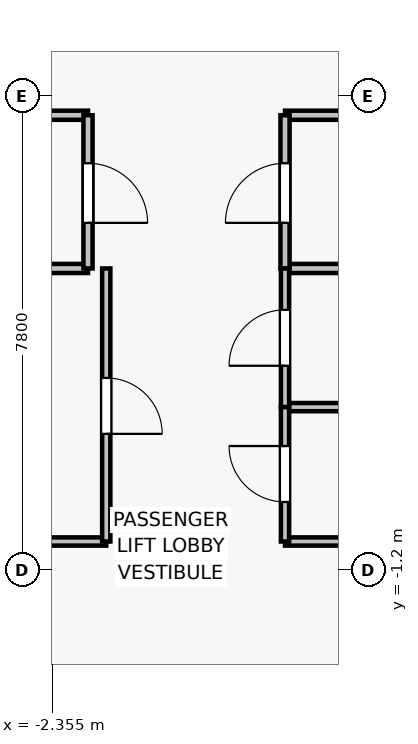
"""IFC4 building model, lengths in metres.
Left out: names, types, materials, properties, quantities, classifications, styles, units other than length and angle.
Written with IfcOpenShell. Run it as: python <this file> out.ifc"""

import sys

from ifc_helpers import new_model, si_unit, direction, frame, frame_2d, origin, place, context, subcontext, project, spatial, rectangle, extrude, source, transform, mapped, element, fill, save


model = new_model("IFC4")
c1 = context("Model", 3, precision=1e-05, world=origin(), true_north=direction((0.0, 1.0)))
c2 = subcontext(c1, "Body", "Model", "MODEL_VIEW")
j1 = project(units=[si_unit("LENGTHUNIT", "METRE"), si_unit("PLANEANGLEUNIT", "RADIAN")], contexts=[c1])
p1 = place(None, origin())
s1 = spatial("IfcSite", under=j1, at=p1, CompositionType="ELEMENT")
p2 = place(p1, origin())
s2 = spatial("IfcBuilding", under=s1, at=p2, CompositionType="ELEMENT")
p3 = place(p2, frame((0.0, 0.0, 238.6)))
s3 = spatial("IfcBuildingStorey", under=s2, at=p3, CompositionType="ELEMENT", Elevation=238.6)
for number, where, z_axis, x_axis in (
    (1, (-1.77, 3.76, 0.0), (0.0, 0.0, 1.0), (-1.0, 0.0, 0.0)),
    (2, (-6.18, 6.28, 0.0), (0.0, 0.0, 1.0), (1.0, 0.0, 0.0)),
):
    element("IfcWall", number, at=place(p3, frame(where, z_axis=z_axis, x_axis=x_axis)), inside=s3, PredefinedType="PARTITIONING", context=c2, shape_type="SweptSolid", body=[
        extrude(rectangle(XDim=4.41, YDim=0.15, at=frame_2d((2.205, 0.0))), origin(), (0.0, 0.0, 1.0), 3.075),
    ])
p4 = place(p3, frame((-1.77, 6.28, 0.0), z_axis=(0.0, 0.0, 1.0), x_axis=(0.0, -1.0, 0.0)))
e3 = element("IfcWall", 3, at=p4, inside=s3, PredefinedType="PARTITIONING", context=c2, shape_type="SweptSolid", body=[
    extrude(rectangle(XDim=2.52, YDim=0.15, at=frame_2d((1.26, 0.0))), origin(), (0.0, 0.0, 1.0), 3.075),
])
p5 = place(p4, frame((0.79, 0.0, 0.0)))
e4 = element("IfcOpeningElement", 4, at=p5, cuts=e3, PredefinedType="OPENING", context=c2, shape_type="SweptSolid", body=[
    extrude(rectangle(XDim=0.98, YDim=2.15, at=frame_2d((0.49, 1.075))), frame((0.0, 0.085, 0.0), z_axis=(0.0, -1.0, 0.0), x_axis=(1.0, 0.0, 0.0)), (0.0, 0.0, 1.0), 0.17),
])
for number, where, z_axis, x_axis in (
    (5, (6.38, 3.76, 0.0), (0.0, 0.0, 1.0), (-1.0, 0.0, 0.0)),
    (6, (1.47, 6.28, 0.0), (0.0, 0.0, 1.0), (1.0, 0.0, 0.0)),
):
    element("IfcWall", number, at=place(p3, frame(where, z_axis=z_axis, x_axis=x_axis)), inside=s3, PredefinedType="PARTITIONING", context=c2, shape_type="SweptSolid", body=[
        extrude(rectangle(XDim=4.91, YDim=0.15, at=frame_2d((2.455, 0.0))), origin(), (0.0, 0.0, 1.0), 3.075),
    ])
p6 = place(p3, frame((1.47, 3.76, 0.0), z_axis=(0.0, 0.0, 1.0), x_axis=(0.0, 1.0, 0.0)))
e7 = element("IfcWall", 7, at=p6, inside=s3, PredefinedType="PARTITIONING", context=c2, shape_type="SweptSolid", body=[
    extrude(rectangle(XDim=2.52, YDim=0.15, at=frame_2d((1.26, 0.0))), origin(), (0.0, 0.0, 1.0), 3.075),
])
p7 = place(p6, frame((0.75, 0.0, 0.0)))
e8 = element("IfcOpeningElement", 8, at=p7, cuts=e7, PredefinedType="OPENING", context=c2, shape_type="SweptSolid", body=[
    extrude(rectangle(XDim=0.98, YDim=2.15, at=frame_2d((0.49, 1.075))), frame((0.0, 0.085, 0.0), z_axis=(0.0, -1.0, 0.0), x_axis=(1.0, 0.0, 0.0)), (0.0, 0.0, 1.0), 0.17),
])
p8 = place(p3, frame((-1.47, -0.73, 0.0), z_axis=(0.0, 0.0, 1.0), x_axis=(-1.0, 0.0, 0.0)))
e9 = element("IfcWall", 9, at=p8, inside=s3, PredefinedType="PARTITIONING", context=c2, shape_type="SweptSolid", body=[
    extrude(rectangle(XDim=5.11, YDim=0.135, at=frame_2d((2.555, 0.0))), origin(), (0.0, 0.0, 1.0), 3.075),
])
p9 = place(p3, frame((-1.47, 3.76, 0.0), z_axis=(0.0, 0.0, 1.0), x_axis=(0.0, -1.0, 0.0)))
e10 = element("IfcWall", 10, at=p9, inside=s3, PredefinedType="PARTITIONING", context=c2, shape_type="SweptSolid", body=[
    extrude(rectangle(XDim=4.49, YDim=0.135, at=frame_2d((2.245, 0.0))), origin(), (0.0, 0.0, 1.0), 3.075),
])
p10 = place(p9, frame((1.8, 0.0, 0.0)))
e11 = element("IfcOpeningElement", 11, at=p10, cuts=e10, PredefinedType="OPENING", context=c2, shape_type="SweptSolid", body=[
    extrude(rectangle(XDim=0.92, YDim=2.1, at=frame_2d((0.46, 1.05))), frame((0.0, 0.077, 0.0), z_axis=(0.0, -1.0, 0.0), x_axis=(1.0, 0.0, 0.0)), (0.0, 0.0, 1.0), 0.155),
])
p11 = place(p3, frame((6.58, 1.48, 0.0), z_axis=(0.0, 0.0, 1.0), x_axis=(-1.0, 0.0, 0.0)))
e12 = element("IfcWall", 12, at=p11, inside=s3, PredefinedType="PARTITIONING", context=c2, shape_type="SweptSolid", body=[
    extrude(rectangle(XDim=5.11, YDim=0.135, at=frame_2d((2.555, 0.0))), origin(), (0.0, 0.0, 1.0), 3.075),
])
p12 = place(p3, frame((1.47, 1.48, 0.0), z_axis=(0.0, 0.0, 1.0), x_axis=(0.0, 1.0, 0.0)))
e13 = element("IfcWall", 13, at=p12, inside=s3, PredefinedType="PARTITIONING", context=c2, shape_type="SweptSolid", body=[
    extrude(rectangle(XDim=2.28, YDim=0.135, at=frame_2d((1.14, 0.0))), origin(), (0.0, 0.0, 1.0), 3.075),
])
p13 = place(p12, frame((0.68, 0.0, 0.0)))
e14 = element("IfcOpeningElement", 14, at=p13, cuts=e13, PredefinedType="OPENING", context=c2, shape_type="SweptSolid", body=[
    extrude(rectangle(XDim=0.92, YDim=2.1, at=frame_2d((0.46, 1.05))), frame((0.0, 0.077, 0.0), z_axis=(0.0, -1.0, 0.0), x_axis=(1.0, 0.0, 0.0)), (0.0, 0.0, 1.0), 0.155),
])
p14 = place(p3, frame((4.18, -0.73, 0.0), z_axis=(0.0, 0.0, 1.0), x_axis=(-1.0, 0.0, 0.0)))
e15 = element("IfcWall", 15, at=p14, inside=s3, PredefinedType="PARTITIONING", context=c2, shape_type="SweptSolid", body=[
    extrude(rectangle(XDim=2.71, YDim=0.135, at=frame_2d((1.355, 0.0))), origin(), (0.0, 0.0, 1.0), 3.075),
])
p15 = place(p3, frame((1.47, -0.73, 0.0), z_axis=(0.0, 0.0, 1.0), x_axis=(0.0, 1.0, 0.0)))
e16 = element("IfcWall", 16, at=p15, inside=s3, PredefinedType="PARTITIONING", context=c2, shape_type="SweptSolid", body=[
    extrude(rectangle(XDim=2.21, YDim=0.135, at=frame_2d((1.105, 0.0))), origin(), (0.0, 0.0, 1.0), 3.075),
])
p16 = place(p15, frame((0.65, 0.0, 0.0)))
e17 = element("IfcOpeningElement", 17, at=p16, cuts=e16, PredefinedType="OPENING", context=c2, shape_type="SweptSolid", body=[
    extrude(rectangle(XDim=0.92, YDim=2.1, at=frame_2d((0.46, 1.05))), frame((0.0, 0.077, 0.0), z_axis=(0.0, -1.0, 0.0), x_axis=(1.0, 0.0, 0.0)), (0.0, 0.0, 1.0), 0.155),
])
m1 = source(origin(), c2, "Body", "SweptSolid", [
    extrude(rectangle(XDim=0.98, YDim=2.15, at=frame_2d((0.49, 1.075))), frame((0.0, 0.025, 0.0), z_axis=(0.0, -1.0, 0.0), x_axis=(1.0, 0.0, 0.0)), (0.0, 0.0, 1.0), 0.05),
])
p17 = place(p5, origin())
e18 = element("IfcDoor", 18, at=p17, inside=s3, OperationType="SINGLE_SWING_RIGHT", PredefinedType="DOOR", context=c2, shape_type="MappedRepresentation", body=[
    mapped(m1, transform((0.0, 0.0, 0.0), x_axis=(1.0, 0.0, 0.0), y_axis=(0.0, 1.0, 0.0), z_axis=(0.0, 0.0, 1.0), scale=1.0)),
])
fill(e4, e18)
p18 = place(p7, origin())
e19 = element("IfcDoor", 19, at=p18, inside=s3, OperationType="SINGLE_SWING_LEFT", PredefinedType="DOOR", context=c2, shape_type="MappedRepresentation", body=[
    mapped(m1, transform((0.0, 0.0, 0.0), x_axis=(1.0, 0.0, 0.0), y_axis=(0.0, 1.0, 0.0), z_axis=(0.0, 0.0, 1.0), scale=1.0)),
])
fill(e8, e19)
m2 = source(origin(), c2, "Body", "SweptSolid", [
    extrude(rectangle(XDim=0.92, YDim=2.1, at=frame_2d((0.46, 1.05))), frame((0.0, 0.025, 0.0), z_axis=(0.0, -1.0, 0.0), x_axis=(1.0, 0.0, 0.0)), (0.0, 0.0, 1.0), 0.05),
])
p19 = place(p10, origin())
e20 = element("IfcDoor", 20, at=p19, inside=s3, OperationType="SINGLE_SWING_RIGHT", PredefinedType="DOOR", context=c2, shape_type="MappedRepresentation", body=[
    mapped(m2, transform((0.0, 0.0, 0.0), x_axis=(1.0, 0.0, 0.0), y_axis=(0.0, 1.0, 0.0), z_axis=(0.0, 0.0, 1.0), scale=1.0)),
])
fill(e11, e20)
p20 = place(p13, origin())
e21 = element("IfcDoor", 21, at=p20, inside=s3, OperationType="SINGLE_SWING_LEFT", PredefinedType="DOOR", context=c2, shape_type="MappedRepresentation", body=[
    mapped(m2, transform((0.0, 0.0, 0.0), x_axis=(1.0, 0.0, 0.0), y_axis=(0.0, 1.0, 0.0), z_axis=(0.0, 0.0, 1.0), scale=1.0)),
])
fill(e14, e21)
p21 = place(p16, origin())
e22 = element("IfcDoor", 22, at=p21, inside=s3, OperationType="SINGLE_SWING_RIGHT", PredefinedType="DOOR", context=c2, shape_type="MappedRepresentation", body=[
    mapped(m2, transform((0.0, 0.0, 0.0), x_axis=(1.0, 0.0, 0.0), y_axis=(0.0, 1.0, 0.0), z_axis=(0.0, 0.0, 1.0), scale=1.0)),
])
fill(e17, e22)
save(model, sys.argv[1])
